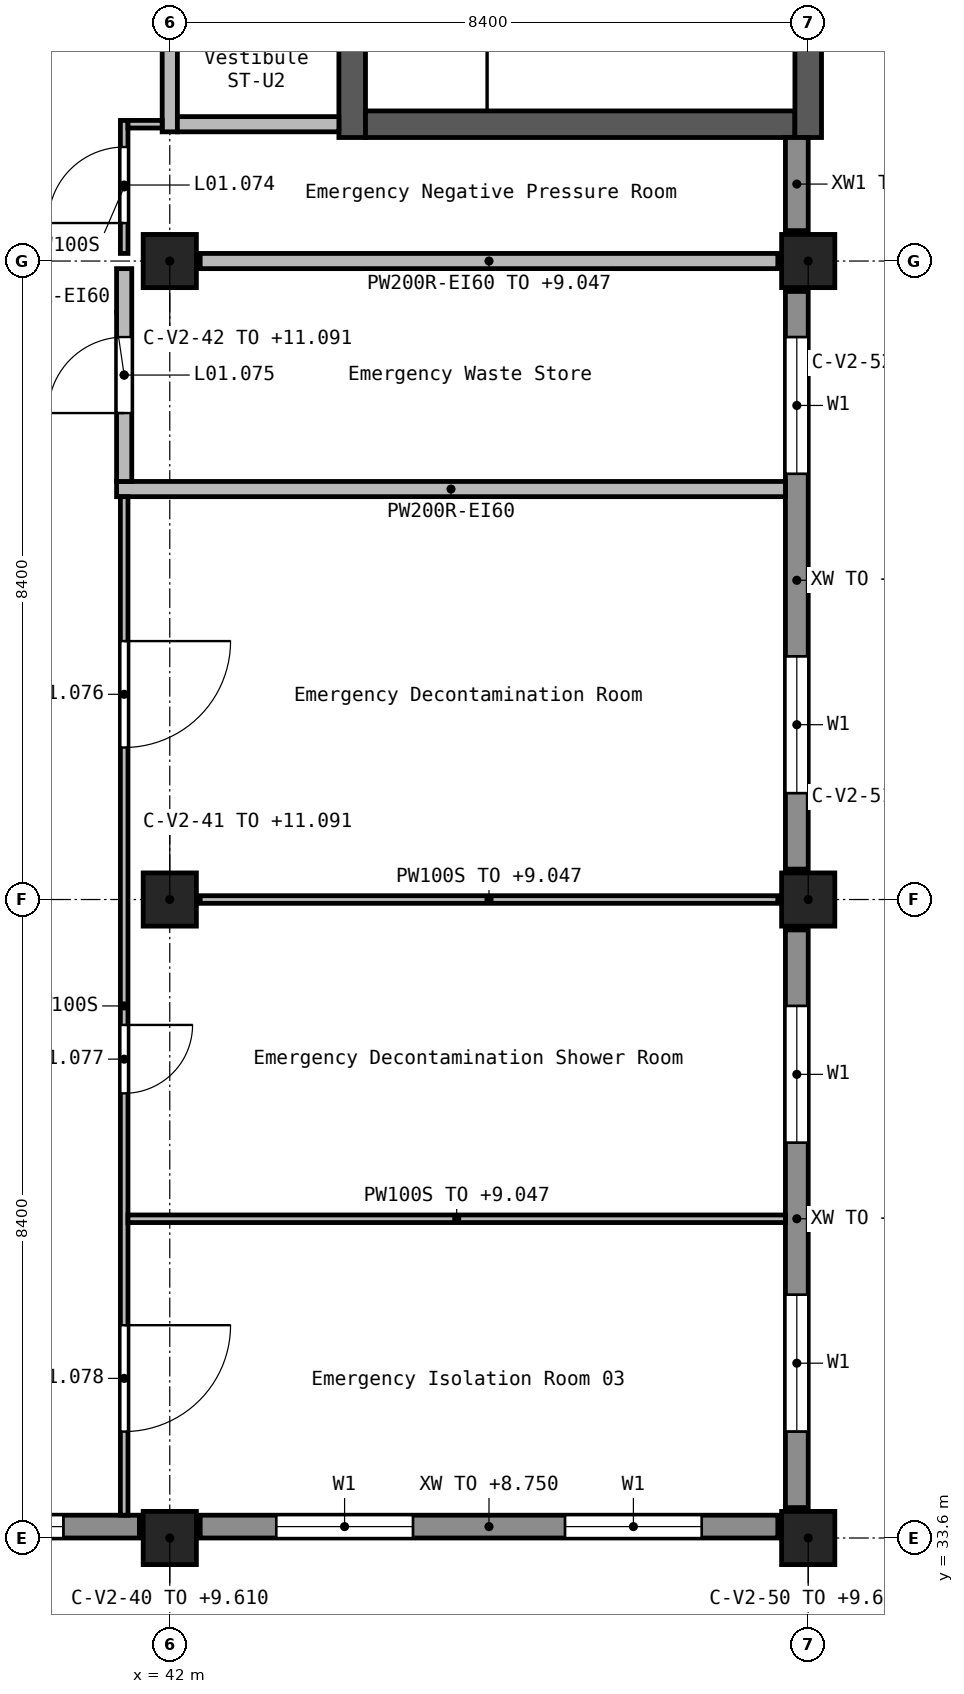
"""IFC4 building model, lengths in metres.
Left out: names, types, materials, properties, quantities, classifications, styles, units other than length and angle.
Written with IfcOpenShell. Run it as: python <this file> out.ifc"""

import sys

from ifc_helpers import new_model, si_unit, direction, frame, frame_2d, origin, origin_2d, place, context, subcontext, project, spatial, rectangle, extrude, element, fill, save


model = new_model("IFC4")
c1 = context("Model", 3, precision=1e-05, world=origin(), true_north=direction((0.0, 1.0)))
c2 = subcontext(c1, "Body", "Model", "MODEL_VIEW")
j1 = project(units=[si_unit("LENGTHUNIT", "METRE"), si_unit("PLANEANGLEUNIT", "RADIAN")], contexts=[c1])
p1 = place(None, origin())
s1 = spatial("IfcSite", under=j1, at=p1, CompositionType="ELEMENT")
p2 = place(p1, origin())
s2 = spatial("IfcBuilding", under=s1, at=p2, CompositionType="ELEMENT")
p3 = place(p2, frame((0.0, 0.0, 5.4)))
s3 = spatial("IfcBuildingStorey", under=s2, at=p3, CompositionType="ELEMENT", Elevation=5.4)
p4 = place(p3, frame((42.0, 33.6, 0.0), z_axis=(0.0, 0.0, 1.0), x_axis=(1.0, 0.0, 0.0)))
e1 = element("IfcColumn", 1, at=p4, inside=s3, PredefinedType="COLUMN", context=c2, shape_type="SweptSolid", body=[
    extrude(rectangle(XDim=0.7, YDim=0.7, at=origin_2d()), origin(), (0.0, 0.0, 1.0), 4.21),
])
for number, where, z_axis, x_axis in (
    (2, (42.0, 42.0, 0.0), (0.0, 0.0, 1.0), (1.0, 0.0, 0.0)),
    (3, (42.0, 50.4, 0.0), (0.0, 0.0, 1.0), (1.0, 0.0, 0.0)),
):
    element("IfcColumn", number, at=place(p3, frame(where, z_axis=z_axis, x_axis=x_axis)), inside=s3, PredefinedType="COLUMN", context=c2, shape_type="SweptSolid", body=[
        extrude(rectangle(XDim=0.7, YDim=0.7, at=origin_2d()), origin(), (0.0, 0.0, 1.0), 5.691),
    ])
for number, where, z_axis, x_axis in (
    (4, (50.4, 33.6, 0.0), (0.0, 0.0, 1.0), (1.0, 0.0, 0.0)),
    (5, (50.4, 42.0, 0.0), (0.0, 0.0, 1.0), (1.0, 0.0, 0.0)),
    (6, (50.4, 50.4, 0.0), (0.0, 0.0, 1.0), (1.0, 0.0, 0.0)),
):
    element("IfcColumn", number, at=place(p3, frame(where, z_axis=z_axis, x_axis=x_axis)), inside=s3, PredefinedType="COLUMN", context=c2, shape_type="SweptSolid", body=[
        extrude(rectangle(XDim=0.7, YDim=0.7, at=origin_2d()), origin(), (0.0, 0.0, 1.0), 4.21),
    ])
p5 = place(p3, frame((44.4, 52.025, 0.0), z_axis=(0.0, 0.0, 1.0), x_axis=(0.0, 1.0, 0.0)))
e7 = element("IfcWall", 7, at=p5, inside=s3, PredefinedType="SHEAR", context=c2, shape_type="SweptSolid", body=[
    extrude(rectangle(XDim=4.8, YDim=0.35, at=frame_2d((2.4, 0.0))), origin(), (0.0, 0.0, 1.0), 4.5),
])
p6 = place(p5, frame((3.275, 0.0, 0.0)))
e8 = element("IfcOpeningElement", 8, at=p6, cuts=e7, PredefinedType="OPENING", context=c2, shape_type="SweptSolid", body=[
    extrude(rectangle(XDim=1.1, YDim=2.1, at=frame_2d((0.55, 1.05))), frame((0.0, 0.185, 0.0), z_axis=(0.0, -1.0, 0.0), x_axis=(1.0, 0.0, 0.0)), (0.0, 0.0, 1.0), 0.37),
])
p7 = place(p3, frame((44.575, 52.2, 0.0), z_axis=(0.0, 0.0, 1.0), x_axis=(1.0, 0.0, 0.0)))
e9 = element("IfcWall", 9, at=p7, inside=s3, PredefinedType="SHEAR", context=c2, shape_type="SweptSolid", body=[
    extrude(rectangle(XDim=5.65, YDim=0.35, at=frame_2d((2.825, 0.0))), origin(), (0.0, 0.0, 1.0), 4.5),
])
p8 = place(p3, frame((50.4, 52.025, 0.0), z_axis=(0.0, 0.0, 1.0), x_axis=(0.0, 1.0, 0.0)))
e10 = element("IfcWall", 10, at=p8, inside=s3, PredefinedType="SHEAR", context=c2, shape_type="SweptSolid", body=[
    extrude(rectangle(XDim=5.15, YDim=0.35, at=frame_2d((2.575, 0.0))), origin(), (0.0, 0.0, 1.0), 4.5),
])
p9 = place(p3, frame((34.0, 33.75, 0.0), z_axis=(0.0, 0.0, 1.0), x_axis=(1.0, 0.0, 0.0)))
e11 = element("IfcWall", 11, at=p9, inside=s3, PredefinedType="STANDARD", context=c2, shape_type="SweptSolid", body=[
    extrude(rectangle(XDim=7.6, YDim=0.3, at=frame_2d((3.8, 0.0))), origin(), (0.0, 0.0, 1.0), 3.35),
])
p10 = place(p9, frame((1.0, 0.0, 0.9)))
e12 = element("IfcOpeningElement", 12, at=p10, cuts=e11, PredefinedType="OPENING", context=c2, shape_type="SweptSolid", body=[
    extrude(rectangle(XDim=1.8, YDim=1.5, at=frame_2d((0.9, 0.75))), frame((0.0, 0.16, 0.0), z_axis=(0.0, -1.0, 0.0), x_axis=(1.0, 0.0, 0.0)), (0.0, 0.0, 1.0), 0.32),
])
p11 = place(p9, frame((4.8, 0.0, 0.9)))
e13 = element("IfcOpeningElement", 13, at=p11, cuts=e11, PredefinedType="OPENING", context=c2, shape_type="SweptSolid", body=[
    extrude(rectangle(XDim=1.8, YDim=1.5, at=frame_2d((0.9, 0.75))), frame((0.0, 0.16, 0.0), z_axis=(0.0, -1.0, 0.0), x_axis=(1.0, 0.0, 0.0)), (0.0, 0.0, 1.0), 0.32),
])
p12 = place(p3, frame((42.4, 33.75, 0.0), z_axis=(0.0, 0.0, 1.0), x_axis=(1.0, 0.0, 0.0)))
e14 = element("IfcWall", 14, at=p12, inside=s3, PredefinedType="STANDARD", context=c2, shape_type="SweptSolid", body=[
    extrude(rectangle(XDim=7.6, YDim=0.3, at=frame_2d((3.8, 0.0))), origin(), (0.0, 0.0, 1.0), 3.35),
])
p13 = place(p12, frame((1.0, 0.0, 0.9)))
e15 = element("IfcOpeningElement", 15, at=p13, cuts=e14, PredefinedType="OPENING", context=c2, shape_type="SweptSolid", body=[
    extrude(rectangle(XDim=1.8, YDim=1.5, at=frame_2d((0.9, 0.75))), frame((0.0, 0.16, 0.0), z_axis=(0.0, -1.0, 0.0), x_axis=(1.0, 0.0, 0.0)), (0.0, 0.0, 1.0), 0.32),
])
p14 = place(p12, frame((4.8, 0.0, 0.9)))
e16 = element("IfcOpeningElement", 16, at=p14, cuts=e14, PredefinedType="OPENING", context=c2, shape_type="SweptSolid", body=[
    extrude(rectangle(XDim=1.8, YDim=1.5, at=frame_2d((0.9, 0.75))), frame((0.0, 0.16, 0.0), z_axis=(0.0, -1.0, 0.0), x_axis=(1.0, 0.0, 0.0)), (0.0, 0.0, 1.0), 0.32),
])
p15 = place(p3, frame((50.25, 34.0, 0.0), z_axis=(0.0, 0.0, 1.0), x_axis=(0.0, 1.0, 0.0)))
e17 = element("IfcWall", 17, at=p15, inside=s3, PredefinedType="STANDARD", context=c2, shape_type="SweptSolid", body=[
    extrude(rectangle(XDim=7.6, YDim=0.3, at=frame_2d((3.8, 0.0))), origin(), (0.0, 0.0, 1.0), 3.35),
])
p16 = place(p15, frame((1.0, 0.0, 0.9)))
e18 = element("IfcOpeningElement", 18, at=p16, cuts=e17, PredefinedType="OPENING", context=c2, shape_type="SweptSolid", body=[
    extrude(rectangle(XDim=1.8, YDim=1.5, at=frame_2d((0.9, 0.75))), frame((0.0, 0.16, 0.0), z_axis=(0.0, -1.0, 0.0), x_axis=(1.0, 0.0, 0.0)), (0.0, 0.0, 1.0), 0.32),
])
p17 = place(p15, frame((4.8, 0.0, 0.9)))
e19 = element("IfcOpeningElement", 19, at=p17, cuts=e17, PredefinedType="OPENING", context=c2, shape_type="SweptSolid", body=[
    extrude(rectangle(XDim=1.8, YDim=1.5, at=frame_2d((0.9, 0.75))), frame((0.0, 0.16, 0.0), z_axis=(0.0, -1.0, 0.0), x_axis=(1.0, 0.0, 0.0)), (0.0, 0.0, 1.0), 0.32),
])
p18 = place(p3, frame((50.25, 42.4, 0.0), z_axis=(0.0, 0.0, 1.0), x_axis=(0.0, 1.0, 0.0)))
e20 = element("IfcWall", 20, at=p18, inside=s3, PredefinedType="STANDARD", context=c2, shape_type="SweptSolid", body=[
    extrude(rectangle(XDim=7.6, YDim=0.3, at=frame_2d((3.8, 0.0))), origin(), (0.0, 0.0, 1.0), 3.35),
])
p19 = place(p18, frame((1.0, 0.0, 0.9)))
e21 = element("IfcOpeningElement", 21, at=p19, cuts=e20, PredefinedType="OPENING", context=c2, shape_type="SweptSolid", body=[
    extrude(rectangle(XDim=1.8, YDim=1.5, at=frame_2d((0.9, 0.75))), frame((0.0, 0.16, 0.0), z_axis=(0.0, -1.0, 0.0), x_axis=(1.0, 0.0, 0.0)), (0.0, 0.0, 1.0), 0.32),
])
p20 = place(p18, frame((5.2, 0.0, 0.9)))
e22 = element("IfcOpeningElement", 22, at=p20, cuts=e20, PredefinedType="OPENING", context=c2, shape_type="SweptSolid", body=[
    extrude(rectangle(XDim=1.8, YDim=1.5, at=frame_2d((0.9, 0.75))), frame((0.0, 0.16, 0.0), z_axis=(0.0, -1.0, 0.0), x_axis=(1.0, 0.0, 0.0)), (0.0, 0.0, 1.0), 0.32),
])
p21 = place(p3, frame((50.25, 50.8, 0.0), z_axis=(0.0, 0.0, 1.0), x_axis=(0.0, 1.0, 0.0)))
e23 = element("IfcWall", 23, at=p21, inside=s3, PredefinedType="STANDARD", context=c2, shape_type="SweptSolid", body=[
    extrude(rectangle(XDim=1.225, YDim=0.3, at=frame_2d((0.612, 0.0))), origin(), (0.0, 0.0, 1.0), 3.35),
])
p22 = place(p3, frame((41.3, 47.4, 0.0), z_axis=(0.0, 0.0, 1.0), x_axis=(1.0, 0.0, 0.0)))
e24 = element("IfcWall", 24, at=p22, inside=s3, PredefinedType="SOLIDWALL", context=c2, shape_type="SweptSolid", body=[
    extrude(rectangle(XDim=8.8, YDim=0.2, at=frame_2d((4.4, 0.0))), origin(), (0.0, 0.0, 1.0), 4.15),
])
p23 = place(p3, frame((42.4, 50.4, 0.0), z_axis=(0.0, 0.0, 1.0), x_axis=(1.0, 0.0, 0.0)))
e25 = element("IfcWall", 25, at=p23, inside=s3, PredefinedType="SOLIDWALL", context=c2, shape_type="SweptSolid", body=[
    extrude(rectangle(XDim=7.6, YDim=0.2, at=frame_2d((3.8, 0.0))), origin(), (0.0, 0.0, 1.0), 3.647),
])
p24 = place(p3, frame((42.0, 52.1, 0.0), z_axis=(0.0, 0.0, 1.0), x_axis=(0.0, 1.0, 0.0)))
e26 = element("IfcWall", 26, at=p24, inside=s3, PredefinedType="SOLIDWALL", context=c2, shape_type="SweptSolid", body=[
    extrude(rectangle(XDim=5.0, YDim=0.2, at=frame_2d((2.5, 0.0))), origin(), (0.0, 0.0, 1.0), 4.15),
])
p25 = place(p24, frame((1.95, 0.0, 0.0)))
e27 = element("IfcOpeningElement", 27, at=p25, cuts=e26, PredefinedType="OPENING", context=c2, shape_type="SweptSolid", body=[
    extrude(rectangle(XDim=1.1, YDim=2.1, at=frame_2d((0.55, 1.05))), frame((0.0, 0.11, 0.0), z_axis=(0.0, -1.0, 0.0), x_axis=(1.0, 0.0, 0.0)), (0.0, 0.0, 1.0), 0.22),
])
p26 = place(p3, frame((41.4, 47.5, 0.0), z_axis=(0.0, 0.0, 1.0), x_axis=(0.0, 1.0, 0.0)))
e28 = element("IfcWall", 28, at=p26, inside=s3, PredefinedType="SOLIDWALL", context=c2, shape_type="SweptSolid", body=[
    extrude(rectangle(XDim=2.8, YDim=0.2, at=frame_2d((1.4, 0.0))), origin(), (0.0, 0.0, 1.0), 4.15),
])
p27 = place(p26, frame((0.9, 0.0, 0.0)))
e29 = element("IfcOpeningElement", 29, at=p27, cuts=e28, PredefinedType="OPENING", context=c2, shape_type="SweptSolid", body=[
    extrude(rectangle(XDim=1.0, YDim=2.1, at=frame_2d((0.5, 1.05))), frame((0.0, 0.11, 0.0), z_axis=(0.0, -1.0, 0.0), x_axis=(1.0, 0.0, 0.0)), (0.0, 0.0, 1.0), 0.22),
])
p28 = place(p3, frame((42.1, 52.2, 0.0), z_axis=(0.0, 0.0, 1.0), x_axis=(1.0, 0.0, 0.0)))
e30 = element("IfcWall", 30, at=p28, inside=s3, PredefinedType="SOLIDWALL", context=c2, shape_type="SweptSolid", body=[
    extrude(rectangle(XDim=2.125, YDim=0.2, at=frame_2d((1.062, 0.0))), origin(), (0.0, 0.0, 1.0), 4.15),
])
p29 = place(p3, frame((41.4, 47.3, 0.0), z_axis=(0.0, 0.0, 1.0), x_axis=(0.0, -1.0, 0.0)))
e31 = element("IfcWall", 31, at=p29, inside=s3, PredefinedType="PARTITIONING", context=c2, shape_type="SweptSolid", body=[
    extrude(rectangle(XDim=13.4, YDim=0.1, at=frame_2d((6.7, 0.0))), origin(), (0.0, 0.0, 1.0), 4.15),
])
p30 = place(p29, frame((1.9, 0.0, 0.0)))
e32 = element("IfcOpeningElement", 32, at=p30, cuts=e31, PredefinedType="OPENING", context=c2, shape_type="SweptSolid", body=[
    extrude(rectangle(XDim=1.4, YDim=2.1, at=frame_2d((0.7, 1.05))), frame((0.0, 0.06, 0.0), z_axis=(0.0, -1.0, 0.0), x_axis=(1.0, 0.0, 0.0)), (0.0, 0.0, 1.0), 0.12),
])
p31 = place(p29, frame((6.95, 0.0, 0.0)))
e33 = element("IfcOpeningElement", 33, at=p31, cuts=e31, PredefinedType="OPENING", context=c2, shape_type="SweptSolid", body=[
    extrude(rectangle(XDim=0.9, YDim=2.1, at=frame_2d((0.45, 1.05))), frame((0.0, 0.06, 0.0), z_axis=(0.0, -1.0, 0.0), x_axis=(1.0, 0.0, 0.0)), (0.0, 0.0, 1.0), 0.12),
])
p32 = place(p29, frame((10.9, 0.0, 0.0)))
e34 = element("IfcOpeningElement", 34, at=p32, cuts=e31, PredefinedType="OPENING", context=c2, shape_type="SweptSolid", body=[
    extrude(rectangle(XDim=1.4, YDim=2.1, at=frame_2d((0.7, 1.05))), frame((0.0, 0.06, 0.0), z_axis=(0.0, -1.0, 0.0), x_axis=(1.0, 0.0, 0.0)), (0.0, 0.0, 1.0), 0.12),
])
p33 = place(p3, frame((41.45, 37.8, 0.0), z_axis=(0.0, 0.0, 1.0), x_axis=(1.0, 0.0, 0.0)))
e35 = element("IfcWall", 35, at=p33, inside=s3, PredefinedType="PARTITIONING", context=c2, shape_type="SweptSolid", body=[
    extrude(rectangle(XDim=8.65, YDim=0.1, at=frame_2d((4.325, 0.0))), origin(), (0.0, 0.0, 1.0), 3.647),
])
p34 = place(p3, frame((42.4, 42.0, 0.0), z_axis=(0.0, 0.0, 1.0), x_axis=(1.0, 0.0, 0.0)))
e36 = element("IfcWall", 36, at=p34, inside=s3, PredefinedType="PARTITIONING", context=c2, shape_type="SweptSolid", body=[
    extrude(rectangle(XDim=7.6, YDim=0.1, at=frame_2d((3.8, 0.0))), origin(), (0.0, 0.0, 1.0), 3.647),
])
p35 = place(p3, frame((41.4, 50.5, 0.0), z_axis=(0.0, 0.0, 1.0), x_axis=(0.0, 1.0, 0.0)))
e37 = element("IfcWall", 37, at=p35, inside=s3, PredefinedType="PARTITIONING", context=c2, shape_type="SweptSolid", body=[
    extrude(rectangle(XDim=1.75, YDim=0.1, at=frame_2d((0.875, 0.0))), origin(), (0.0, 0.0, 1.0), 4.15),
])
p36 = place(p35, frame((0.4, 0.0, 0.0)))
e38 = element("IfcOpeningElement", 38, at=p36, cuts=e37, PredefinedType="OPENING", context=c2, shape_type="SweptSolid", body=[
    extrude(rectangle(XDim=1.0, YDim=2.1, at=frame_2d((0.5, 1.05))), frame((0.0, 0.06, 0.0), z_axis=(0.0, -1.0, 0.0), x_axis=(1.0, 0.0, 0.0)), (0.0, 0.0, 1.0), 0.12),
])
p37 = place(p3, frame((41.45, 52.2, 0.0), z_axis=(0.0, 0.0, 1.0), x_axis=(1.0, 0.0, 0.0)))
e39 = element("IfcWall", 39, at=p37, inside=s3, PredefinedType="PARTITIONING", context=c2, shape_type="SweptSolid", body=[
    extrude(rectangle(XDim=0.45, YDim=0.1, at=frame_2d((0.225, 0.0))), origin(), (0.0, 0.0, 1.0), 4.15),
])
p38 = place(p11, origin())
e40 = element("IfcWindow", 40, at=p38, inside=s3, PartitioningType="SINGLE_PANEL", PredefinedType="WINDOW", context=c2, shape_type="SweptSolid", body=[
    extrude(rectangle(XDim=1.8, YDim=1.5, at=frame_2d((0.9, 0.75))), frame((0.0, 0.03, 0.0), z_axis=(0.0, -1.0, 0.0), x_axis=(1.0, 0.0, 0.0)), (0.0, 0.0, 1.0), 0.06),
])
fill(e13, e40)
p39 = place(p13, origin())
e41 = element("IfcWindow", 41, at=p39, inside=s3, PartitioningType="SINGLE_PANEL", PredefinedType="WINDOW", context=c2, shape_type="SweptSolid", body=[
    extrude(rectangle(XDim=1.8, YDim=1.5, at=frame_2d((0.9, 0.75))), frame((0.0, 0.03, 0.0), z_axis=(0.0, -1.0, 0.0), x_axis=(1.0, 0.0, 0.0)), (0.0, 0.0, 1.0), 0.06),
])
fill(e15, e41)
p40 = place(p14, origin())
e42 = element("IfcWindow", 42, at=p40, inside=s3, PartitioningType="SINGLE_PANEL", PredefinedType="WINDOW", context=c2, shape_type="SweptSolid", body=[
    extrude(rectangle(XDim=1.8, YDim=1.5, at=frame_2d((0.9, 0.75))), frame((0.0, 0.03, 0.0), z_axis=(0.0, -1.0, 0.0), x_axis=(1.0, 0.0, 0.0)), (0.0, 0.0, 1.0), 0.06),
])
fill(e16, e42)
p41 = place(p16, origin())
e43 = element("IfcWindow", 43, at=p41, inside=s3, PartitioningType="SINGLE_PANEL", PredefinedType="WINDOW", context=c2, shape_type="SweptSolid", body=[
    extrude(rectangle(XDim=1.8, YDim=1.5, at=frame_2d((0.9, 0.75))), frame((0.0, 0.03, 0.0), z_axis=(0.0, -1.0, 0.0), x_axis=(1.0, 0.0, 0.0)), (0.0, 0.0, 1.0), 0.06),
])
fill(e18, e43)
p42 = place(p17, origin())
e44 = element("IfcWindow", 44, at=p42, inside=s3, PartitioningType="SINGLE_PANEL", PredefinedType="WINDOW", context=c2, shape_type="SweptSolid", body=[
    extrude(rectangle(XDim=1.8, YDim=1.5, at=frame_2d((0.9, 0.75))), frame((0.0, 0.03, 0.0), z_axis=(0.0, -1.0, 0.0), x_axis=(1.0, 0.0, 0.0)), (0.0, 0.0, 1.0), 0.06),
])
fill(e19, e44)
p43 = place(p19, origin())
e45 = element("IfcWindow", 45, at=p43, inside=s3, PartitioningType="SINGLE_PANEL", PredefinedType="WINDOW", context=c2, shape_type="SweptSolid", body=[
    extrude(rectangle(XDim=1.8, YDim=1.5, at=frame_2d((0.9, 0.75))), frame((0.0, 0.03, 0.0), z_axis=(0.0, -1.0, 0.0), x_axis=(1.0, 0.0, 0.0)), (0.0, 0.0, 1.0), 0.06),
])
fill(e21, e45)
p44 = place(p20, origin())
e46 = element("IfcWindow", 46, at=p44, inside=s3, PartitioningType="SINGLE_PANEL", PredefinedType="WINDOW", context=c2, shape_type="SweptSolid", body=[
    extrude(rectangle(XDim=1.8, YDim=1.5, at=frame_2d((0.9, 0.75))), frame((0.0, 0.03, 0.0), z_axis=(0.0, -1.0, 0.0), x_axis=(1.0, 0.0, 0.0)), (0.0, 0.0, 1.0), 0.06),
])
fill(e22, e46)
p45 = place(p36, frame((1.0, 0.0, 0.0), z_axis=(0.0, 0.0, 1.0), x_axis=(-1.0, 0.0, 0.0)))
e47 = element("IfcDoor", 47, at=p45, inside=s3, OperationType="SINGLE_SWING_LEFT", PredefinedType="DOOR", context=c2, shape_type="SweptSolid", body=[
    extrude(rectangle(XDim=1.0, YDim=2.1, at=frame_2d((0.5, 1.05))), frame((0.0, 0.025, 0.0), z_axis=(0.0, -1.0, 0.0), x_axis=(1.0, 0.0, 0.0)), (0.0, 0.0, 1.0), 0.05),
])
fill(e38, e47)
p46 = place(p27, frame((1.0, 0.0, 0.0), z_axis=(0.0, 0.0, 1.0), x_axis=(-1.0, 0.0, 0.0)))
e48 = element("IfcDoor", 48, at=p46, inside=s3, OperationType="SINGLE_SWING_RIGHT", PredefinedType="DOOR", context=c2, shape_type="SweptSolid", body=[
    extrude(rectangle(XDim=1.0, YDim=2.1, at=frame_2d((0.5, 1.05))), frame((0.0, 0.025, 0.0), z_axis=(0.0, -1.0, 0.0), x_axis=(1.0, 0.0, 0.0)), (0.0, 0.0, 1.0), 0.05),
])
fill(e29, e48)
p47 = place(p30, origin())
e49 = element("IfcDoor", 49, at=p47, inside=s3, OperationType="DOUBLE_DOOR_SINGLE_SWING", PredefinedType="DOOR", context=c2, shape_type="SweptSolid", body=[
    extrude(rectangle(XDim=1.4, YDim=2.1, at=frame_2d((0.7, 1.05))), frame((0.0, 0.025, 0.0), z_axis=(0.0, -1.0, 0.0), x_axis=(1.0, 0.0, 0.0)), (0.0, 0.0, 1.0), 0.05),
])
fill(e32, e49)
p48 = place(p31, origin())
e50 = element("IfcDoor", 50, at=p48, inside=s3, OperationType="SINGLE_SWING_RIGHT", PredefinedType="DOOR", context=c2, shape_type="SweptSolid", body=[
    extrude(rectangle(XDim=0.9, YDim=2.1, at=frame_2d((0.45, 1.05))), frame((0.0, 0.025, 0.0), z_axis=(0.0, -1.0, 0.0), x_axis=(1.0, 0.0, 0.0)), (0.0, 0.0, 1.0), 0.05),
])
fill(e33, e50)
p49 = place(p32, origin())
e51 = element("IfcDoor", 51, at=p49, inside=s3, OperationType="DOUBLE_DOOR_SINGLE_SWING", PredefinedType="DOOR", context=c2, shape_type="SweptSolid", body=[
    extrude(rectangle(XDim=1.4, YDim=2.1, at=frame_2d((0.7, 1.05))), frame((0.0, 0.025, 0.0), z_axis=(0.0, -1.0, 0.0), x_axis=(1.0, 0.0, 0.0)), (0.0, 0.0, 1.0), 0.05),
])
fill(e34, e51)
save(model, sys.argv[1])
